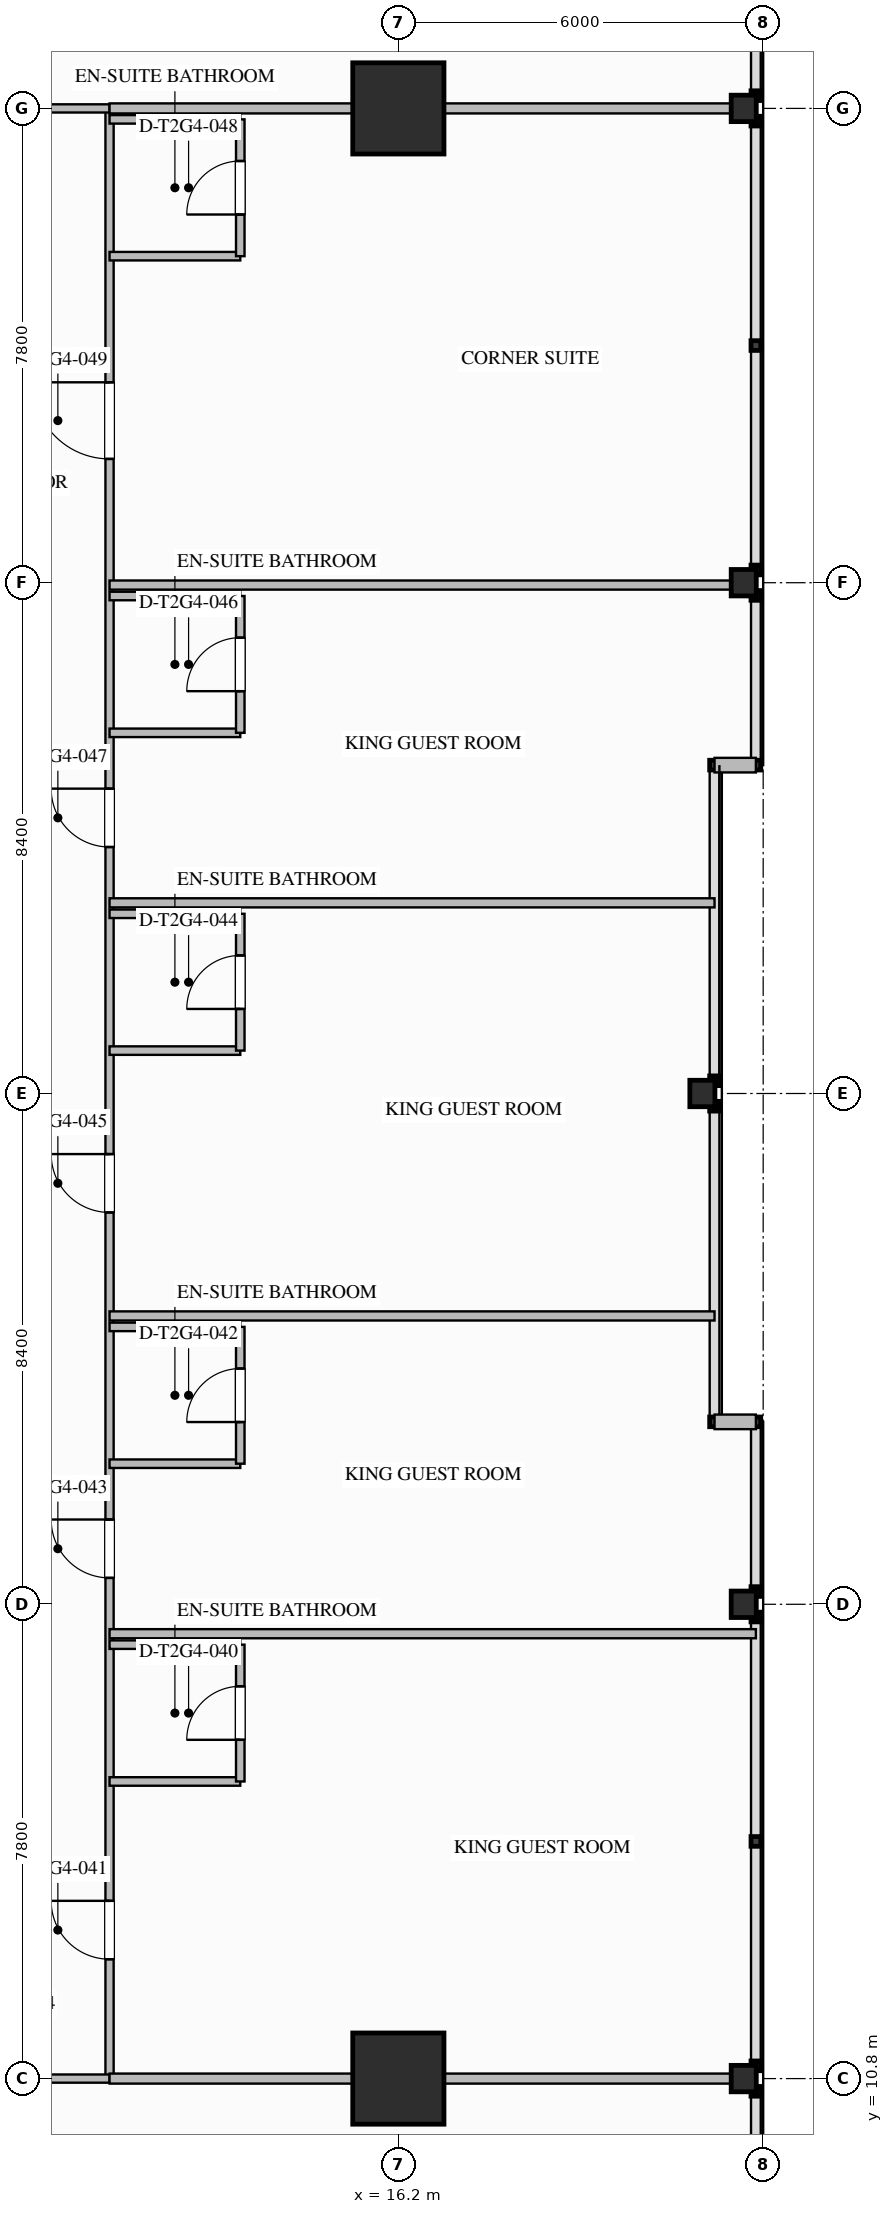
"""IFC4 building model, lengths in metres.
Left out: names, types, materials, properties, quantities, classifications, styles, units other than length and angle.
Written with IfcOpenShell. Run it as: python <this file> out.ifc"""

import sys

from ifc_helpers import new_model, si_unit, direction, frame, frame_2d, origin, origin_2d, place, context, subcontext, project, spatial, rectangle, i_section, extrude, element, fill, save


model = new_model("IFC4")
c1 = context("Model", 3, precision=1e-05, world=origin(), true_north=direction((0.0, 1.0)))
c2 = subcontext(c1, "Body", "Model", "MODEL_VIEW")
j1 = project(units=[si_unit("LENGTHUNIT", "METRE"), si_unit("PLANEANGLEUNIT", "RADIAN")], contexts=[c1])
p1 = place(None, origin())
s1 = spatial("IfcSite", under=j1, at=p1, CompositionType="ELEMENT")
p2 = place(p1, origin())
s2 = spatial("IfcBuilding", under=s1, at=p2, CompositionType="ELEMENT")
p3 = place(p2, frame((0.0, 0.0, 123.3)))
s3 = spatial("IfcBuildingStorey", under=s2, at=p3, CompositionType="ELEMENT", Elevation=123.3)
for number, where, z_axis, x_axis in (
    (1, (16.2, 10.8, 0.0), (0.0, 0.0, 1.0), (1.0, 0.0, 0.0)),
    (2, (16.2, 43.2, 0.0), (0.0, 0.0, 1.0), (1.0, 0.0, 0.0)),
):
    element("IfcColumn", number, at=place(p3, frame(where, z_axis=z_axis, x_axis=x_axis)), inside=s3, PredefinedType="COLUMN", context=c2, shape_type="SweptSolid", body=[
        extrude(rectangle(XDim=1.5, YDim=1.5, at=origin_2d()), origin(), (0.0, 0.0, 1.0), 3.5),
    ])
for number, where, z_axis, x_axis in (
    (3, (21.88, 10.8, 0.0), (0.0, 0.0, 1.0), (1.0, 0.0, 0.0)),
    (4, (21.88, 18.6, 0.0), (0.0, 0.0, 1.0), (1.0, 0.0, 0.0)),
    (5, (21.2, 27.0, 0.0), (0.0, 0.0, 1.0), (1.0, 0.0, 0.0)),
    (6, (21.88, 35.4, 0.0), (0.0, 0.0, 1.0), (1.0, 0.0, 0.0)),
    (7, (21.88, 43.2, 0.0), (0.0, 0.0, 1.0), (1.0, 0.0, 0.0)),
):
    element("IfcColumn", number, at=place(p3, frame(where, z_axis=z_axis, x_axis=x_axis)), inside=s3, PredefinedType="COLUMN", context=c2, shape_type="SweptSolid", body=[
        extrude(i_section(OverallWidth=0.412, OverallDepth=0.435, WebThickness=0.036, FlangeThickness=0.057, FilletRadius=0.028, at=origin_2d()), origin(), (0.0, 0.0, 1.0), 3.497),
    ])
for number, where, z_axis, x_axis in (
    (8, (22.08, 32.4, 0.0), (0.0, 0.0, 1.0), (-1.0, 0.0, 0.0)),
    (9, (21.4, 21.6, 0.0), (0.0, 0.0, 1.0), (1.0, 0.0, 0.0)),
):
    element("IfcWall", number, at=place(p3, frame(where, z_axis=z_axis, x_axis=x_axis)), inside=s3, PredefinedType="STANDARD", context=c2, shape_type="SweptSolid", body=[
        extrude(rectangle(XDim=0.68, YDim=0.24, at=frame_2d((0.34, 0.0))), origin(), (0.0, 0.0, 1.0), 3.24),
    ])
p4 = place(p3, frame((11.45, 10.8, 0.0), z_axis=(0.0, 0.0, 1.0), x_axis=(0.0, 1.0, 0.0)))
e10 = element("IfcWall", 10, at=p4, inside=s3, PredefinedType="PARTITIONING", context=c2, shape_type="SweptSolid", body=[
    extrude(rectangle(XDim=32.4, YDim=0.135, at=frame_2d((16.2, 0.0))), origin(), (0.0, 0.0, 1.0), 3.24),
])
p5 = place(p4, frame((1.963, 0.0, 0.0)))
e11 = element("IfcOpeningElement", 11, at=p5, cuts=e10, PredefinedType="OPENING", context=c2, shape_type="SweptSolid", body=[
    extrude(rectangle(XDim=0.96, YDim=2.15, at=frame_2d((0.48, 1.075))), frame((0.0, 0.077, 0.0), z_axis=(0.0, -1.0, 0.0), x_axis=(1.0, 0.0, 0.0)), (0.0, 0.0, 1.0), 0.155),
])
p6 = place(p4, frame((8.234, 0.0, 0.0)))
e12 = element("IfcOpeningElement", 12, at=p6, cuts=e10, PredefinedType="OPENING", context=c2, shape_type="SweptSolid", body=[
    extrude(rectangle(XDim=0.96, YDim=2.15, at=frame_2d((0.48, 1.075))), frame((0.0, 0.077, 0.0), z_axis=(0.0, -1.0, 0.0), x_axis=(1.0, 0.0, 0.0)), (0.0, 0.0, 1.0), 0.155),
])
p7 = place(p4, frame((14.244, 0.0, 0.0)))
e13 = element("IfcOpeningElement", 13, at=p7, cuts=e10, PredefinedType="OPENING", context=c2, shape_type="SweptSolid", body=[
    extrude(rectangle(XDim=0.96, YDim=2.15, at=frame_2d((0.48, 1.075))), frame((0.0, 0.077, 0.0), z_axis=(0.0, -1.0, 0.0), x_axis=(1.0, 0.0, 0.0)), (0.0, 0.0, 1.0), 0.155),
])
p8 = place(p4, frame((20.253, 0.0, 0.0)))
e14 = element("IfcOpeningElement", 14, at=p8, cuts=e10, PredefinedType="OPENING", context=c2, shape_type="SweptSolid", body=[
    extrude(rectangle(XDim=0.96, YDim=2.15, at=frame_2d((0.48, 1.075))), frame((0.0, 0.077, 0.0), z_axis=(0.0, -1.0, 0.0), x_axis=(1.0, 0.0, 0.0)), (0.0, 0.0, 1.0), 0.155),
])
p9 = place(p4, frame((26.636, 0.0, 0.0)))
e15 = element("IfcOpeningElement", 15, at=p9, cuts=e10, PredefinedType="OPENING", context=c2, shape_type="SweptSolid", body=[
    extrude(rectangle(XDim=1.26, YDim=2.2, at=frame_2d((0.63, 1.1))), frame((0.0, 0.077, 0.0), z_axis=(0.0, -1.0, 0.0), x_axis=(1.0, 0.0, 0.0)), (0.0, 0.0, 1.0), 0.155),
])
p10 = place(p3, frame((8.7, 10.8, 0.0), z_axis=(0.0, 0.0, 1.0), x_axis=(1.0, 0.0, 0.0)))
e16 = element("IfcWall", 16, at=p10, inside=s3, PredefinedType="PARTITIONING", context=c2, shape_type="SweptSolid", body=[
    extrude(rectangle(XDim=2.75, YDim=0.135, at=frame_2d((1.375, 0.0))), origin(), (0.0, 0.0, 1.0), 2.53),
])
p11 = place(p10, frame((0.52, 0.0, 0.0)))
e17 = element("IfcOpeningElement", 17, at=p11, cuts=e16, PredefinedType="OPENING", context=c2, shape_type="SweptSolid", body=[
    extrude(rectangle(XDim=1.02, YDim=2.15, at=frame_2d((0.51, 1.075))), frame((0.0, 0.077, 0.0), z_axis=(0.0, -1.0, 0.0), x_axis=(1.0, 0.0, 0.0)), (0.0, 0.0, 1.0), 0.155),
])
p12 = place(p3, frame((8.7, 43.2, 0.0), z_axis=(0.0, 0.0, 1.0), x_axis=(1.0, 0.0, 0.0)))
e18 = element("IfcWall", 18, at=p12, inside=s3, PredefinedType="PARTITIONING", context=c2, shape_type="SweptSolid", body=[
    extrude(rectangle(XDim=2.75, YDim=0.135, at=frame_2d((1.375, 0.0))), origin(), (0.0, 0.0, 1.0), 2.53),
])
p13 = place(p12, frame((0.52, 0.0, 0.0)))
e19 = element("IfcOpeningElement", 19, at=p13, cuts=e18, PredefinedType="OPENING", context=c2, shape_type="SweptSolid", body=[
    extrude(rectangle(XDim=1.02, YDim=2.15, at=frame_2d((0.51, 1.075))), frame((0.0, 0.077, 0.0), z_axis=(0.0, -1.0, 0.0), x_axis=(1.0, 0.0, 0.0)), (0.0, 0.0, 1.0), 0.155),
])
for number, where, z_axis, x_axis in (
    (20, (11.45, 10.8, 0.0), (0.0, 0.0, 1.0), (1.0, 0.0, 0.0)),
    (21, (11.45, 43.2, 0.0), (0.0, 0.0, 1.0), (1.0, 0.0, 0.0)),
):
    element("IfcWall", number, at=place(p3, frame(where, z_axis=z_axis, x_axis=x_axis)), inside=s3, PredefinedType="PARTITIONING", context=c2, shape_type="SweptSolid", body=[
        extrude(rectangle(XDim=10.63, YDim=0.165, at=frame_2d((5.315, 0.0))), origin(), (0.0, 0.0, 1.0), 2.53),
    ])
for number, where, z_axis, x_axis in (
    (22, (11.45, 15.686, 0.0), (0.0, 0.0, 1.0), (1.0, 0.0, 0.0)),
    (23, (11.45, 17.936, 0.0), (0.0, 0.0, 1.0), (1.0, 0.0, 0.0)),
):
    element("IfcWall", number, at=place(p3, frame(where, z_axis=z_axis, x_axis=x_axis)), inside=s3, PredefinedType="PLUMBINGWALL", context=c2, shape_type="SweptSolid", body=[
        extrude(rectangle(XDim=2.15, YDim=0.14, at=frame_2d((1.075, 0.0))), origin(), (0.0, 0.0, 1.0), 3.24),
    ])
p14 = place(p3, frame((13.6, 15.686, 0.0), z_axis=(0.0, 0.0, 1.0), x_axis=(0.0, 1.0, 0.0)))
e24 = element("IfcWall", 24, at=p14, inside=s3, PredefinedType="PLUMBINGWALL", context=c2, shape_type="SweptSolid", body=[
    extrude(rectangle(XDim=2.25, YDim=0.14, at=frame_2d((1.125, 0.0))), origin(), (0.0, 0.0, 1.0), 3.24),
])
p15 = place(p14, frame((0.685, 0.0, 0.0)))
e25 = element("IfcOpeningElement", 25, at=p15, cuts=e24, PredefinedType="OPENING", context=c2, shape_type="SweptSolid", body=[
    extrude(rectangle(XDim=0.88, YDim=2.1, at=frame_2d((0.44, 1.05))), frame((0.0, 0.08, 0.0), z_axis=(0.0, -1.0, 0.0), x_axis=(1.0, 0.0, 0.0)), (0.0, 0.0, 1.0), 0.16),
])
p16 = place(p3, frame((11.45, 18.116, 0.0), z_axis=(0.0, 0.0, 1.0), x_axis=(1.0, 0.0, 0.0)))
e26 = element("IfcWall", 26, at=p16, inside=s3, PredefinedType="PARTITIONING", context=c2, shape_type="SweptSolid", body=[
    extrude(rectangle(XDim=10.63, YDim=0.15, at=frame_2d((5.315, 0.0))), origin(), (0.0, 0.0, 1.0), 3.24),
])
for number, where, z_axis, x_axis in (
    (27, (11.45, 20.912, 0.0), (0.0, 0.0, 1.0), (1.0, 0.0, 0.0)),
    (28, (11.45, 23.162, 0.0), (0.0, 0.0, 1.0), (1.0, 0.0, 0.0)),
):
    element("IfcWall", number, at=place(p3, frame(where, z_axis=z_axis, x_axis=x_axis)), inside=s3, PredefinedType="PLUMBINGWALL", context=c2, shape_type="SweptSolid", body=[
        extrude(rectangle(XDim=2.15, YDim=0.14, at=frame_2d((1.075, 0.0))), origin(), (0.0, 0.0, 1.0), 3.24),
    ])
p17 = place(p3, frame((13.6, 20.912, 0.0), z_axis=(0.0, 0.0, 1.0), x_axis=(0.0, 1.0, 0.0)))
e29 = element("IfcWall", 29, at=p17, inside=s3, PredefinedType="PLUMBINGWALL", context=c2, shape_type="SweptSolid", body=[
    extrude(rectangle(XDim=2.25, YDim=0.14, at=frame_2d((1.125, 0.0))), origin(), (0.0, 0.0, 1.0), 3.24),
])
p18 = place(p17, frame((0.685, 0.0, 0.0)))
e30 = element("IfcOpeningElement", 30, at=p18, cuts=e29, PredefinedType="OPENING", context=c2, shape_type="SweptSolid", body=[
    extrude(rectangle(XDim=0.88, YDim=2.1, at=frame_2d((0.44, 1.05))), frame((0.0, 0.08, 0.0), z_axis=(0.0, -1.0, 0.0), x_axis=(1.0, 0.0, 0.0)), (0.0, 0.0, 1.0), 0.16),
])
p19 = place(p3, frame((11.45, 23.342, 0.0), z_axis=(0.0, 0.0, 1.0), x_axis=(1.0, 0.0, 0.0)))
e31 = element("IfcWall", 31, at=p19, inside=s3, PredefinedType="PARTITIONING", context=c2, shape_type="SweptSolid", body=[
    extrude(rectangle(XDim=9.95, YDim=0.15, at=frame_2d((4.975, 0.0))), origin(), (0.0, 0.0, 1.0), 3.24),
])
for number, where, z_axis, x_axis in (
    (32, (11.45, 27.706, 0.0), (0.0, 0.0, 1.0), (1.0, 0.0, 0.0)),
    (33, (11.45, 29.956, 0.0), (0.0, 0.0, 1.0), (1.0, 0.0, 0.0)),
):
    element("IfcWall", number, at=place(p3, frame(where, z_axis=z_axis, x_axis=x_axis)), inside=s3, PredefinedType="PLUMBINGWALL", context=c2, shape_type="SweptSolid", body=[
        extrude(rectangle(XDim=2.15, YDim=0.14, at=frame_2d((1.075, 0.0))), origin(), (0.0, 0.0, 1.0), 3.24),
    ])
p20 = place(p3, frame((13.6, 27.706, 0.0), z_axis=(0.0, 0.0, 1.0), x_axis=(0.0, 1.0, 0.0)))
e34 = element("IfcWall", 34, at=p20, inside=s3, PredefinedType="PLUMBINGWALL", context=c2, shape_type="SweptSolid", body=[
    extrude(rectangle(XDim=2.25, YDim=0.14, at=frame_2d((1.125, 0.0))), origin(), (0.0, 0.0, 1.0), 3.24),
])
p21 = place(p20, frame((0.685, 0.0, 0.0)))
e35 = element("IfcOpeningElement", 35, at=p21, cuts=e34, PredefinedType="OPENING", context=c2, shape_type="SweptSolid", body=[
    extrude(rectangle(XDim=0.88, YDim=2.1, at=frame_2d((0.44, 1.05))), frame((0.0, 0.08, 0.0), z_axis=(0.0, -1.0, 0.0), x_axis=(1.0, 0.0, 0.0)), (0.0, 0.0, 1.0), 0.16),
])
p22 = place(p3, frame((11.45, 30.135, 0.0), z_axis=(0.0, 0.0, 1.0), x_axis=(1.0, 0.0, 0.0)))
e36 = element("IfcWall", 36, at=p22, inside=s3, PredefinedType="PARTITIONING", context=c2, shape_type="SweptSolid", body=[
    extrude(rectangle(XDim=9.95, YDim=0.15, at=frame_2d((4.975, 0.0))), origin(), (0.0, 0.0, 1.0), 3.24),
])
p23 = place(p3, frame((11.45, 32.931, 0.0), z_axis=(0.0, 0.0, 1.0), x_axis=(1.0, 0.0, 0.0)))
e37 = element("IfcWall", 37, at=p23, inside=s3, PredefinedType="PLUMBINGWALL", context=c2, shape_type="SweptSolid", body=[
    extrude(rectangle(XDim=2.15, YDim=0.14, at=frame_2d((1.075, 0.0))), origin(), (0.0, 0.0, 1.0), 3.24),
])
p24 = place(p3, frame((11.45, 35.181, 0.0), z_axis=(0.0, 0.0, 1.0), x_axis=(1.0, 0.0, 0.0)))
e38 = element("IfcWall", 38, at=p24, inside=s3, PredefinedType="PLUMBINGWALL", context=c2, shape_type="SweptSolid", body=[
    extrude(rectangle(XDim=2.15, YDim=0.14, at=frame_2d((1.075, 0.0))), origin(), (0.0, 0.0, 1.0), 2.617),
])
p25 = place(p3, frame((13.6, 32.931, 0.0), z_axis=(0.0, 0.0, 1.0), x_axis=(0.0, 1.0, 0.0)))
e39 = element("IfcWall", 39, at=p25, inside=s3, PredefinedType="PLUMBINGWALL", context=c2, shape_type="SweptSolid", body=[
    extrude(rectangle(XDim=2.25, YDim=0.14, at=frame_2d((1.125, 0.0))), origin(), (0.0, 0.0, 1.0), 3.24),
])
p26 = place(p25, frame((0.685, 0.0, 0.0)))
e40 = element("IfcOpeningElement", 40, at=p26, cuts=e39, PredefinedType="OPENING", context=c2, shape_type="SweptSolid", body=[
    extrude(rectangle(XDim=0.88, YDim=2.1, at=frame_2d((0.44, 1.05))), frame((0.0, 0.08, 0.0), z_axis=(0.0, -1.0, 0.0), x_axis=(1.0, 0.0, 0.0)), (0.0, 0.0, 1.0), 0.16),
])
p27 = place(p3, frame((11.45, 35.361, 0.0), z_axis=(0.0, 0.0, 1.0), x_axis=(1.0, 0.0, 0.0)))
e41 = element("IfcWall", 41, at=p27, inside=s3, PredefinedType="PARTITIONING", context=c2, shape_type="SweptSolid", body=[
    extrude(rectangle(XDim=10.63, YDim=0.15, at=frame_2d((5.315, 0.0))), origin(), (0.0, 0.0, 1.0), 2.53),
])
p28 = place(p3, frame((11.45, 40.77, 0.0), z_axis=(0.0, 0.0, 1.0), x_axis=(1.0, 0.0, 0.0)))
e42 = element("IfcWall", 42, at=p28, inside=s3, PredefinedType="PLUMBINGWALL", context=c2, shape_type="SweptSolid", body=[
    extrude(rectangle(XDim=2.15, YDim=0.14, at=frame_2d((1.075, 0.0))), origin(), (0.0, 0.0, 1.0), 3.24),
])
p29 = place(p3, frame((11.45, 43.02, 0.0), z_axis=(0.0, 0.0, 1.0), x_axis=(1.0, 0.0, 0.0)))
e43 = element("IfcWall", 43, at=p29, inside=s3, PredefinedType="PLUMBINGWALL", context=c2, shape_type="SweptSolid", body=[
    extrude(rectangle(XDim=2.15, YDim=0.14, at=frame_2d((1.075, 0.0))), origin(), (0.0, 0.0, 1.0), 2.53),
])
p30 = place(p3, frame((13.6, 40.77, 0.0), z_axis=(0.0, 0.0, 1.0), x_axis=(0.0, 1.0, 0.0)))
e44 = element("IfcWall", 44, at=p30, inside=s3, PredefinedType="PLUMBINGWALL", context=c2, shape_type="SweptSolid", body=[
    extrude(rectangle(XDim=2.25, YDim=0.14, at=frame_2d((1.125, 0.0))), origin(), (0.0, 0.0, 1.0), 3.24),
])
p31 = place(p30, frame((0.685, 0.0, 0.0)))
e45 = element("IfcOpeningElement", 45, at=p31, cuts=e44, PredefinedType="OPENING", context=c2, shape_type="SweptSolid", body=[
    extrude(rectangle(XDim=0.88, YDim=2.1, at=frame_2d((0.44, 1.05))), frame((0.0, 0.08, 0.0), z_axis=(0.0, -1.0, 0.0), x_axis=(1.0, 0.0, 0.0)), (0.0, 0.0, 1.0), 0.16),
])
p32 = place(p15, origin())
e46 = element("IfcDoor", 46, at=p32, inside=s3, OperationType="SINGLE_SWING_LEFT", PredefinedType="DOOR", context=c2, shape_type="SweptSolid", body=[
    extrude(rectangle(XDim=0.88, YDim=2.1, at=frame_2d((0.44, 1.05))), frame((0.0, 0.025, 0.0), z_axis=(0.0, -1.0, 0.0), x_axis=(1.0, 0.0, 0.0)), (0.0, 0.0, 1.0), 0.05),
])
fill(e25, e46)
p33 = place(p5, origin())
e47 = element("IfcDoor", 47, at=p33, inside=s3, OperationType="SINGLE_SWING_RIGHT", PredefinedType="DOOR", context=c2, shape_type="SweptSolid", body=[
    extrude(rectangle(XDim=0.96, YDim=2.15, at=frame_2d((0.48, 1.075))), frame((0.0, 0.025, 0.0), z_axis=(0.0, -1.0, 0.0), x_axis=(1.0, 0.0, 0.0)), (0.0, 0.0, 1.0), 0.05),
])
fill(e11, e47)
p34 = place(p18, origin())
e48 = element("IfcDoor", 48, at=p34, inside=s3, OperationType="SINGLE_SWING_LEFT", PredefinedType="DOOR", context=c2, shape_type="SweptSolid", body=[
    extrude(rectangle(XDim=0.88, YDim=2.1, at=frame_2d((0.44, 1.05))), frame((0.0, 0.025, 0.0), z_axis=(0.0, -1.0, 0.0), x_axis=(1.0, 0.0, 0.0)), (0.0, 0.0, 1.0), 0.05),
])
fill(e30, e48)
p35 = place(p6, origin())
e49 = element("IfcDoor", 49, at=p35, inside=s3, OperationType="SINGLE_SWING_RIGHT", PredefinedType="DOOR", context=c2, shape_type="SweptSolid", body=[
    extrude(rectangle(XDim=0.96, YDim=2.15, at=frame_2d((0.48, 1.075))), frame((0.0, 0.025, 0.0), z_axis=(0.0, -1.0, 0.0), x_axis=(1.0, 0.0, 0.0)), (0.0, 0.0, 1.0), 0.05),
])
fill(e12, e49)
p36 = place(p21, origin())
e50 = element("IfcDoor", 50, at=p36, inside=s3, OperationType="SINGLE_SWING_LEFT", PredefinedType="DOOR", context=c2, shape_type="SweptSolid", body=[
    extrude(rectangle(XDim=0.88, YDim=2.1, at=frame_2d((0.44, 1.05))), frame((0.0, 0.025, 0.0), z_axis=(0.0, -1.0, 0.0), x_axis=(1.0, 0.0, 0.0)), (0.0, 0.0, 1.0), 0.05),
])
fill(e35, e50)
p37 = place(p7, origin())
e51 = element("IfcDoor", 51, at=p37, inside=s3, OperationType="SINGLE_SWING_RIGHT", PredefinedType="DOOR", context=c2, shape_type="SweptSolid", body=[
    extrude(rectangle(XDim=0.96, YDim=2.15, at=frame_2d((0.48, 1.075))), frame((0.0, 0.025, 0.0), z_axis=(0.0, -1.0, 0.0), x_axis=(1.0, 0.0, 0.0)), (0.0, 0.0, 1.0), 0.05),
])
fill(e13, e51)
p38 = place(p26, origin())
e52 = element("IfcDoor", 52, at=p38, inside=s3, OperationType="SINGLE_SWING_LEFT", PredefinedType="DOOR", context=c2, shape_type="SweptSolid", body=[
    extrude(rectangle(XDim=0.88, YDim=2.1, at=frame_2d((0.44, 1.05))), frame((0.0, 0.025, 0.0), z_axis=(0.0, -1.0, 0.0), x_axis=(1.0, 0.0, 0.0)), (0.0, 0.0, 1.0), 0.05),
])
fill(e40, e52)
p39 = place(p8, origin())
e53 = element("IfcDoor", 53, at=p39, inside=s3, OperationType="SINGLE_SWING_RIGHT", PredefinedType="DOOR", context=c2, shape_type="SweptSolid", body=[
    extrude(rectangle(XDim=0.96, YDim=2.15, at=frame_2d((0.48, 1.075))), frame((0.0, 0.025, 0.0), z_axis=(0.0, -1.0, 0.0), x_axis=(1.0, 0.0, 0.0)), (0.0, 0.0, 1.0), 0.05),
])
fill(e14, e53)
p40 = place(p31, origin())
e54 = element("IfcDoor", 54, at=p40, inside=s3, OperationType="SINGLE_SWING_LEFT", PredefinedType="DOOR", context=c2, shape_type="SweptSolid", body=[
    extrude(rectangle(XDim=0.88, YDim=2.1, at=frame_2d((0.44, 1.05))), frame((0.0, 0.025, 0.0), z_axis=(0.0, -1.0, 0.0), x_axis=(1.0, 0.0, 0.0)), (0.0, 0.0, 1.0), 0.05),
])
fill(e45, e54)
p41 = place(p9, origin())
e55 = element("IfcDoor", 55, at=p41, inside=s3, OperationType="SINGLE_SWING_RIGHT", PredefinedType="DOOR", context=c2, shape_type="SweptSolid", body=[
    extrude(rectangle(XDim=1.26, YDim=2.2, at=frame_2d((0.63, 1.1))), frame((0.0, 0.025, 0.0), z_axis=(0.0, -1.0, 0.0), x_axis=(1.0, 0.0, 0.0)), (0.0, 0.0, 1.0), 0.05),
])
fill(e15, e55)
save(model, sys.argv[1])
